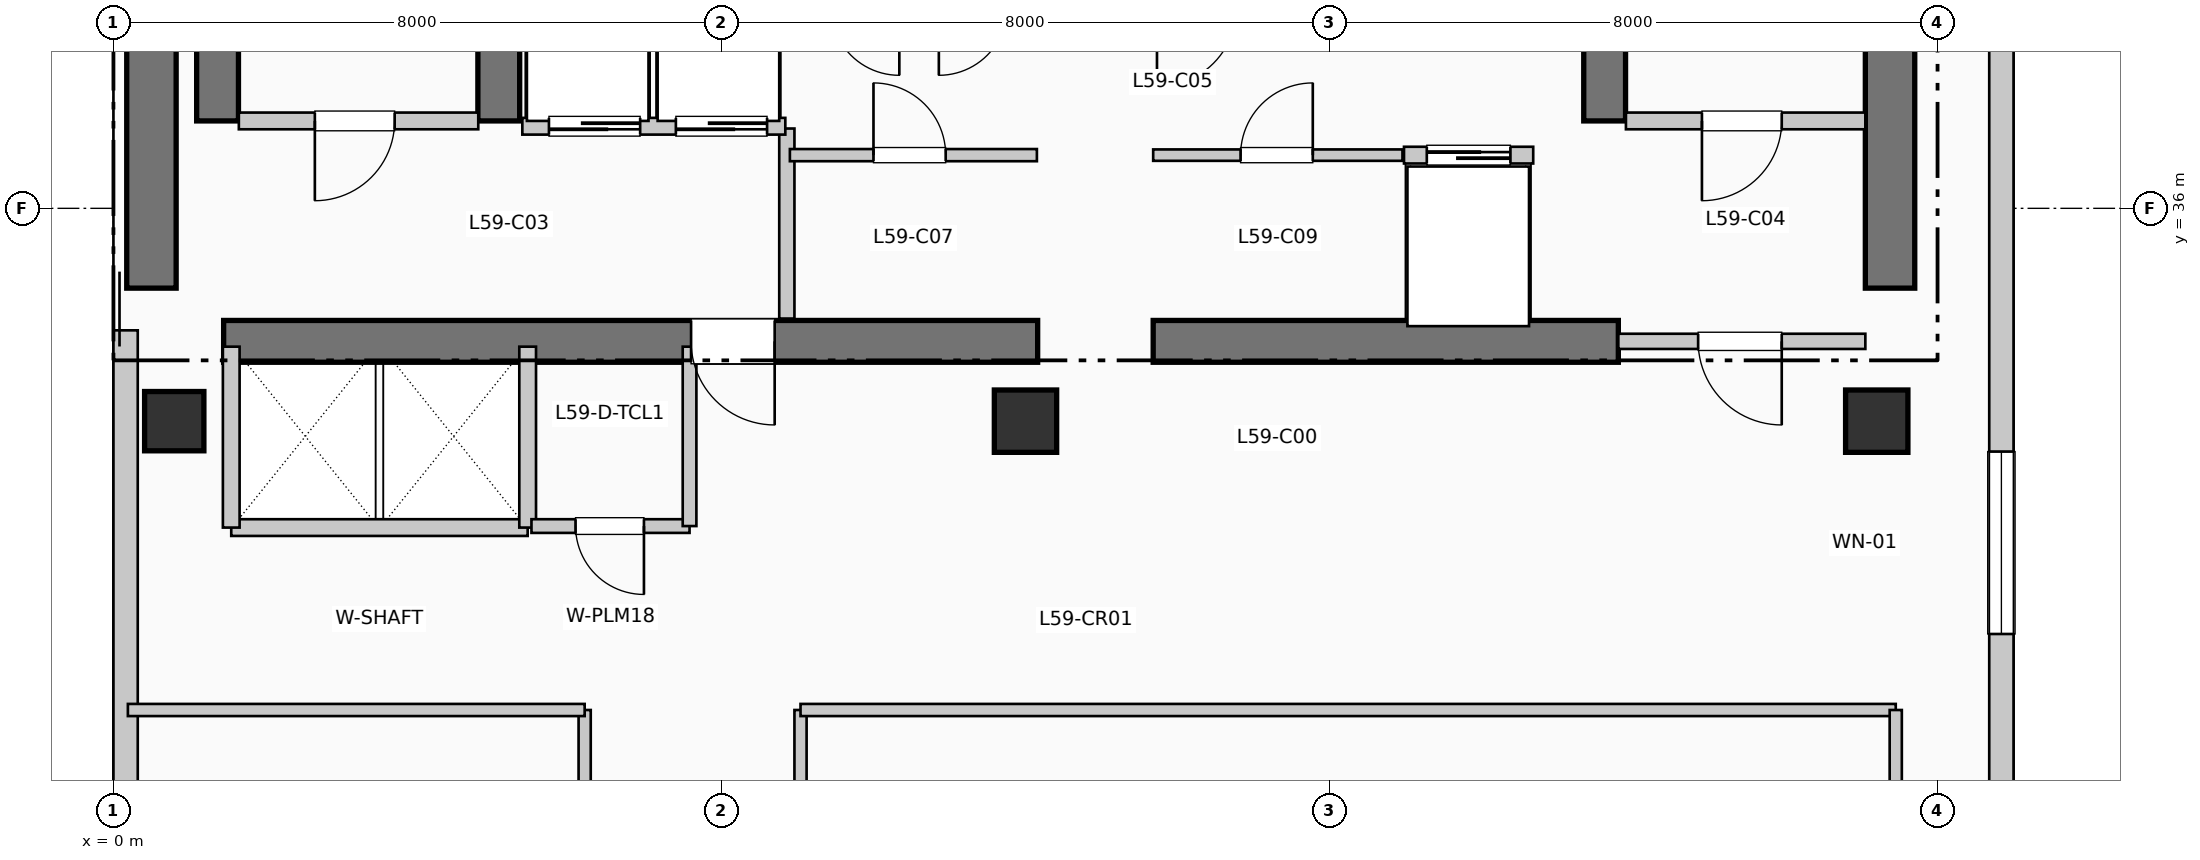
"""IFC4 building model, lengths in metres.
Left out: names, types, materials, properties, quantities, classifications, styles, units other than length and angle.
Written with IfcOpenShell. Run it as: python <this file> out.ifc"""

import sys

from ifc_helpers import new_model, si_unit, direction, frame, frame_2d, origin, origin_2d, place, context, subcontext, project, spatial, rectangle, extrude, element, fill, save


model = new_model("IFC4")
c1 = context("Model", 3, precision=1e-05, world=origin(), true_north=direction((0.0, 1.0)))
c2 = subcontext(c1, "Body", "Model", "MODEL_VIEW")
j1 = project(units=[si_unit("LENGTHUNIT", "METRE"), si_unit("PLANEANGLEUNIT", "RADIAN")], contexts=[c1])
p1 = place(None, origin())
s1 = spatial("IfcSite", under=j1, at=p1, CompositionType="ELEMENT")
p2 = place(p1, origin())
s2 = spatial("IfcBuilding", under=s1, at=p2, CompositionType="ELEMENT")
p3 = place(p2, frame((0.0, 0.0, 243.54)))
s3 = spatial("IfcBuildingStorey", under=s2, at=p3, CompositionType="ELEMENT", Elevation=243.54)
p4 = place(p3, frame((0.5, 34.95, 0.0), z_axis=(0.0, 0.0, 1.0), x_axis=(0.0, 1.0, 0.0)))
e1 = element("IfcWall", 1, at=p4, inside=s3, PredefinedType="SHEAR", context=c2, shape_type="SweptSolid", body=[
    extrude(rectangle(XDim=7.9, YDim=0.65, at=frame_2d((3.95, 0.0))), origin(), (0.0, 0.0, 1.0), 3.96),
])
p5 = place(p3, frame((23.375, 34.95, 0.0), z_axis=(0.0, 0.0, 1.0), x_axis=(0.0, 1.0, 0.0)))
e2 = element("IfcWall", 2, at=p5, inside=s3, PredefinedType="SHEAR", context=c2, shape_type="SweptSolid", body=[
    extrude(rectangle(XDim=10.64, YDim=0.65, at=frame_2d((5.32, 0.0))), origin(), (0.0, 0.0, 1.0), 3.96),
])
p6 = place(p3, frame((1.45, 34.25, 0.0), z_axis=(0.0, 0.0, 1.0), x_axis=(1.0, 0.0, 0.0)))
e3 = element("IfcWall", 3, at=p6, inside=s3, PredefinedType="SHEAR", context=c2, shape_type="SweptSolid", body=[
    extrude(rectangle(XDim=10.71, YDim=0.55, at=frame_2d((5.355, 0.0))), origin(), (0.0, 0.0, 1.0), 3.96),
])
p7 = place(p6, frame((7.25, 0.0, 0.0), z_axis=(0.0, 0.0, 1.0), x_axis=(-1.0, 0.0, 0.0)))
e4 = element("IfcOpeningElement", 4, at=p7, cuts=e3, PredefinedType="OPENING", context=c2, shape_type="SweptSolid", body=[
    extrude(rectangle(XDim=1.1, YDim=2.15, at=frame_2d((0.55, 1.075))), frame((0.0, 0.285, 0.0), z_axis=(0.0, -1.0, 0.0), x_axis=(1.0, 0.0, 0.0)), (0.0, 0.0, 1.0), 0.57),
])
p8 = place(p3, frame((13.68, 34.25, 0.0), z_axis=(0.0, 0.0, 1.0), x_axis=(1.0, 0.0, 0.0)))
e5 = element("IfcWall", 5, at=p8, inside=s3, PredefinedType="SHEAR", context=c2, shape_type="SweptSolid", body=[
    extrude(rectangle(XDim=6.12, YDim=0.55, at=frame_2d((3.06, 0.0))), origin(), (0.0, 0.0, 1.0), 3.96),
])
for number, where, z_axis, x_axis in (
    (6, (1.37, 37.15, 0.0), (0.0, 0.0, 1.0), (0.0, 1.0, 0.0)),
    (7, (5.07, 37.15, 0.0), (0.0, 0.0, 1.0), (0.0, 1.0, 0.0)),
    (8, (19.62, 37.15, 0.0), (0.0, 0.0, 1.0), (0.0, 1.0, 0.0)),
):
    element("IfcWall", number, at=place(p3, frame(where, z_axis=z_axis, x_axis=x_axis)), inside=s3, PredefinedType="SHEAR", context=c2, shape_type="SweptSolid", body=[
        extrude(rectangle(XDim=7.89, YDim=0.55, at=frame_2d((3.945, 0.0))), origin(), (0.0, 0.0, 1.0), 3.96),
    ])
p9 = place(p3, frame((0.8, 33.2, 0.0), z_axis=(0.0, 0.0, 1.0), x_axis=(1.0, 0.0, 0.0)))
e9 = element("IfcColumn", 9, at=p9, inside=s3, PredefinedType="COLUMN", context=c2, shape_type="SweptSolid", body=[
    extrude(rectangle(XDim=0.78, YDim=0.78, at=origin_2d()), origin(), (0.0, 0.0, 1.0), 3.96),
])
for number, where, z_axis, x_axis in (
    (10, (12.0, 33.2, 0.0), (0.0, 0.0, 1.0), (1.0, 0.0, 0.0)),
    (11, (23.2, 33.2, 0.0), (0.0, 0.0, 1.0), (1.0, 0.0, 0.0)),
):
    element("IfcColumn", number, at=place(p3, frame(where, z_axis=z_axis, x_axis=x_axis)), inside=s3, PredefinedType="COLUMN", context=c2, shape_type="SweptSolid", body=[
        extrude(rectangle(XDim=0.82, YDim=0.82, at=origin_2d()), origin(), (0.0, 0.0, 1.0), 3.96),
    ])
p10 = place(p3, frame((24.84, 22.055, 0.0), z_axis=(0.0, 0.0, 1.0), x_axis=(0.0, 1.0, 0.0)))
e12 = element("IfcWall", 12, at=p10, inside=s3, PredefinedType="SOLIDWALL", context=c2, shape_type="SweptSolid", body=[
    extrude(rectangle(XDim=19.09, YDim=0.32, at=frame_2d((9.545, 0.0))), origin(), (0.0, 0.0, 1.0), 3.71),
])
p11 = place(p10, frame((8.345, 0.0, 0.85)))
e13 = element("IfcOpeningElement", 13, at=p11, cuts=e12, PredefinedType="OPENING", context=c2, shape_type="SweptSolid", body=[
    extrude(rectangle(XDim=2.4, YDim=2.05, at=frame_2d((1.2, 1.025))), frame((0.0, 0.17, 0.0), z_axis=(0.0, -1.0, 0.0), x_axis=(1.0, 0.0, 0.0)), (0.0, 0.0, 1.0), 0.34),
])
p12 = place(p3, frame((0.16, 34.395, 0.0), z_axis=(0.0, 0.0, 1.0), x_axis=(0.0, -1.0, 0.0)))
e14 = element("IfcWall", 14, at=p12, inside=s3, PredefinedType="SOLIDWALL", context=c2, shape_type="SweptSolid", body=[
    extrude(rectangle(XDim=25.54, YDim=0.32, at=frame_2d((12.77, 0.0))), origin(), (0.0, 0.0, 1.0), 3.71),
])
p13 = place(p3, frame((1.65, 37.15, 0.0), z_axis=(0.0, 0.0, 1.0), x_axis=(1.0, 0.0, 0.0)))
e15 = element("IfcWall", 15, at=p13, inside=s3, PredefinedType="PARTITIONING", context=c2, shape_type="SweptSolid", body=[
    extrude(rectangle(XDim=3.15, YDim=0.22, at=frame_2d((1.575, 0.0))), origin(), (0.0, 0.0, 1.0), 3.71),
])
p14 = place(p13, frame((2.05, 0.0, 0.0), z_axis=(0.0, 0.0, 1.0), x_axis=(-1.0, 0.0, 0.0)))
e16 = element("IfcOpeningElement", 16, at=p14, cuts=e15, PredefinedType="OPENING", context=c2, shape_type="SweptSolid", body=[
    extrude(rectangle(XDim=1.05, YDim=2.15, at=frame_2d((0.525, 1.075))), frame((0.0, 0.12, 0.0), z_axis=(0.0, -1.0, 0.0), x_axis=(1.0, 0.0, 0.0)), (0.0, 0.0, 1.0), 0.24),
])
p15 = place(p3, frame((8.86, 34.55, 0.0), z_axis=(0.0, 0.0, 1.0), x_axis=(0.0, 1.0, 0.0)))
e17 = element("IfcWall", 17, at=p15, inside=s3, PredefinedType="PARTITIONING", context=c2, shape_type="SweptSolid", body=[
    extrude(rectangle(XDim=2.5, YDim=0.2, at=frame_2d((1.25, 0.0))), origin(), (0.0, 0.0, 1.0), 3.71),
])
p16 = place(p3, frame((19.9, 37.15, 0.0), z_axis=(0.0, 0.0, 1.0), x_axis=(1.0, 0.0, 0.0)))
e18 = element("IfcWall", 18, at=p16, inside=s3, PredefinedType="PARTITIONING", context=c2, shape_type="SweptSolid", body=[
    extrude(rectangle(XDim=3.15, YDim=0.22, at=frame_2d((1.575, 0.0))), origin(), (0.0, 0.0, 1.0), 3.71),
])
p17 = place(p16, frame((2.05, 0.0, 0.0), z_axis=(0.0, 0.0, 1.0), x_axis=(-1.0, 0.0, 0.0)))
e19 = element("IfcOpeningElement", 19, at=p17, cuts=e18, PredefinedType="OPENING", context=c2, shape_type="SweptSolid", body=[
    extrude(rectangle(XDim=1.05, YDim=2.15, at=frame_2d((0.525, 1.075))), frame((0.0, 0.12, 0.0), z_axis=(0.0, -1.0, 0.0), x_axis=(1.0, 0.0, 0.0)), (0.0, 0.0, 1.0), 0.24),
])
p18 = place(p3, frame((19.8, 34.25, 0.0), z_axis=(0.0, 0.0, 1.0), x_axis=(1.0, 0.0, 0.0)))
e20 = element("IfcWall", 20, at=p18, inside=s3, PredefinedType="PARTITIONING", context=c2, shape_type="SweptSolid", body=[
    extrude(rectangle(XDim=3.25, YDim=0.2, at=frame_2d((1.625, 0.0))), origin(), (0.0, 0.0, 1.0), 3.71),
])
p19 = place(p18, frame((2.15, 0.0, 0.0), z_axis=(0.0, 0.0, 1.0), x_axis=(-1.0, 0.0, 0.0)))
e21 = element("IfcOpeningElement", 21, at=p19, cuts=e20, PredefinedType="OPENING", context=c2, shape_type="SweptSolid", body=[
    extrude(rectangle(XDim=1.1, YDim=2.15, at=frame_2d((0.55, 1.075))), frame((0.0, 0.11, 0.0), z_axis=(0.0, -1.0, 0.0), x_axis=(1.0, 0.0, 0.0)), (0.0, 0.0, 1.0), 0.22),
])
p20 = place(p3, frame((5.38, 37.08, 0.0), z_axis=(0.0, 0.0, 1.0), x_axis=(1.0, 0.0, 0.0)))
e22 = element("IfcWall", 22, at=p20, inside=s3, PredefinedType="PARTITIONING", context=c2, shape_type="SweptSolid", body=[
    extrude(rectangle(XDim=3.46, YDim=0.22, at=frame_2d((1.73, 0.0))), origin(), (0.0, 0.0, 1.0), 3.71),
])
p21 = place(p20, frame((1.55, 0.0, 0.0), z_axis=(0.0, 0.0, 1.0), x_axis=(-1.0, 0.0, 0.0)))
e23 = element("IfcOpeningElement", 23, at=p21, cuts=e22, PredefinedType="OPENING", context=c2, shape_type="SweptSolid", body=[
    extrude(rectangle(XDim=1.2, YDim=2.2, at=frame_2d((0.6, 1.1))), frame((0.0, 0.12, 0.0), z_axis=(0.0, -1.0, 0.0), x_axis=(1.0, 0.0, 0.0)), (0.0, 0.0, 1.0), 0.24),
])
p22 = place(p20, frame((3.22, 0.0, 0.0), z_axis=(0.0, 0.0, 1.0), x_axis=(-1.0, 0.0, 0.0)))
e24 = element("IfcOpeningElement", 24, at=p22, cuts=e22, PredefinedType="OPENING", context=c2, shape_type="SweptSolid", body=[
    extrude(rectangle(XDim=1.2, YDim=2.2, at=frame_2d((0.6, 1.1))), frame((0.0, 0.12, 0.0), z_axis=(0.0, -1.0, 0.0), x_axis=(1.0, 0.0, 0.0)), (0.0, 0.0, 1.0), 0.24),
])
p23 = place(p3, frame((1.55, 31.8, 0.0), z_axis=(0.0, 0.0, 1.0), x_axis=(1.0, 0.0, 0.0)))
e25 = element("IfcWall", 25, at=p23, inside=s3, PredefinedType="PARTITIONING", context=c2, shape_type="SweptSolid", body=[
    extrude(rectangle(XDim=3.9, YDim=0.22, at=frame_2d((1.95, 0.0))), origin(), (0.0, 0.0, 1.0), 3.71),
])
for number, where, z_axis, x_axis in (
    (26, (1.55, 31.8, 0.0), (0.0, 0.0, 1.0), (0.0, 1.0, 0.0)),
    (27, (5.45, 31.8, 0.0), (0.0, 0.0, 1.0), (0.0, 1.0, 0.0)),
):
    element("IfcWall", number, at=place(p3, frame(where, z_axis=z_axis, x_axis=x_axis)), inside=s3, PredefinedType="PARTITIONING", context=c2, shape_type="SweptSolid", body=[
        extrude(rectangle(XDim=2.38, YDim=0.22, at=frame_2d((1.19, 0.0))), origin(), (0.0, 0.0, 1.0), 3.71),
    ])
p24 = place(p3, frame((5.5, 31.82, 0.0), z_axis=(0.0, 0.0, 1.0), x_axis=(1.0, 0.0, 0.0)))
e28 = element("IfcWall", 28, at=p24, inside=s3, PredefinedType="PLUMBINGWALL", context=c2, shape_type="SweptSolid", body=[
    extrude(rectangle(XDim=2.08, YDim=0.18, at=frame_2d((1.04, 0.0))), origin(), (0.0, 0.0, 1.0), 3.71),
])
p25 = place(p24, frame((1.48, 0.0, 0.0), z_axis=(0.0, 0.0, 1.0), x_axis=(-1.0, 0.0, 0.0)))
e29 = element("IfcOpeningElement", 29, at=p25, cuts=e28, PredefinedType="OPENING", context=c2, shape_type="SweptSolid", body=[
    extrude(rectangle(XDim=0.9, YDim=2.1, at=frame_2d((0.45, 1.05))), frame((0.0, 0.1, 0.0), z_axis=(0.0, -1.0, 0.0), x_axis=(1.0, 0.0, 0.0)), (0.0, 0.0, 1.0), 0.2),
])
p26 = place(p3, frame((7.58, 31.82, 0.0), z_axis=(0.0, 0.0, 1.0), x_axis=(0.0, 1.0, 0.0)))
e30 = element("IfcWall", 30, at=p26, inside=s3, PredefinedType="PLUMBINGWALL", context=c2, shape_type="SweptSolid", body=[
    extrude(rectangle(XDim=2.36, YDim=0.18, at=frame_2d((1.18, 0.0))), origin(), (0.0, 0.0, 1.0), 3.71),
])
p27 = place(p3, frame((8.9, 36.7, 0.0), z_axis=(0.0, 0.0, 1.0), x_axis=(1.0, 0.0, 0.0)))
e31 = element("IfcWall", 31, at=p27, inside=s3, PredefinedType="PARTITIONING", context=c2, shape_type="SweptSolid", body=[
    extrude(rectangle(XDim=3.25, YDim=0.16, at=frame_2d((1.625, 0.0))), origin(), (0.0, 0.0, 1.0), 3.71),
])
p28 = place(p27, frame((1.1, 0.0, 0.0)))
e32 = element("IfcOpeningElement", 32, at=p28, cuts=e31, PredefinedType="OPENING", context=c2, shape_type="SweptSolid", body=[
    extrude(rectangle(XDim=0.95, YDim=2.15, at=frame_2d((0.475, 1.075))), frame((0.0, 0.09, 0.0), z_axis=(0.0, -1.0, 0.0), x_axis=(1.0, 0.0, 0.0)), (0.0, 0.0, 1.0), 0.18),
])
p29 = place(p3, frame((13.68, 36.7, 0.0), z_axis=(0.0, 0.0, 1.0), x_axis=(1.0, 0.0, 0.0)))
e33 = element("IfcWall", 33, at=p29, inside=s3, PredefinedType="PARTITIONING", context=c2, shape_type="SweptSolid", body=[
    extrude(rectangle(XDim=3.28, YDim=0.15, at=frame_2d((1.64, 0.0))), origin(), (0.0, 0.0, 1.0), 3.71),
])
p30 = place(p29, frame((1.15, 0.0, 0.0)))
e34 = element("IfcOpeningElement", 34, at=p30, cuts=e33, PredefinedType="OPENING", context=c2, shape_type="SweptSolid", body=[
    extrude(rectangle(XDim=0.95, YDim=2.15, at=frame_2d((0.475, 1.075))), frame((0.0, 0.085, 0.0), z_axis=(0.0, -1.0, 0.0), x_axis=(1.0, 0.0, 0.0)), (0.0, 0.0, 1.0), 0.17),
])
p31 = place(p3, frame((16.98, 36.7, 0.0), z_axis=(0.0, 0.0, 1.0), x_axis=(1.0, 0.0, 0.0)))
e35 = element("IfcWall", 35, at=p31, inside=s3, PredefinedType="PARTITIONING", context=c2, shape_type="SweptSolid", body=[
    extrude(rectangle(XDim=1.7, YDim=0.22, at=frame_2d((0.85, 0.0))), origin(), (0.0, 0.0, 1.0), 3.71),
])
p32 = place(p31, frame((0.3, 0.0, 0.0)))
e36 = element("IfcOpeningElement", 36, at=p32, cuts=e35, PredefinedType="OPENING", context=c2, shape_type="SweptSolid", body=[
    extrude(rectangle(XDim=1.1, YDim=2.2, at=frame_2d((0.55, 1.1))), frame((0.0, 0.12, 0.0), z_axis=(0.0, -1.0, 0.0), x_axis=(1.0, 0.0, 0.0)), (0.0, 0.0, 1.0), 0.24),
])
p33 = place(p3, frame((6.2, 11.6, 0.0), z_axis=(0.0, 0.0, 1.0), x_axis=(0.0, 1.0, 0.0)))
e37 = element("IfcWall", 37, at=p33, inside=s3, PredefinedType="PARTITIONING", context=c2, shape_type="SweptSolid", body=[
    extrude(rectangle(XDim=17.8, YDim=0.16, at=frame_2d((8.9, 0.0))), origin(), (0.0, 0.0, 1.0), 3.71),
])
p34 = place(p33, frame((3.857, 0.0, 0.0), z_axis=(0.0, 0.0, 1.0), x_axis=(-1.0, 0.0, 0.0)))
e38 = element("IfcOpeningElement", 38, at=p34, cuts=e37, PredefinedType="OPENING", context=c2, shape_type="SweptSolid", body=[
    extrude(rectangle(XDim=0.95, YDim=2.15, at=frame_2d((0.475, 1.075))), frame((0.0, 0.09, 0.0), z_axis=(0.0, -1.0, 0.0), x_axis=(1.0, 0.0, 0.0)), (0.0, 0.0, 1.0), 0.18),
])
p35 = place(p33, frame((12.757, 0.0, 0.0), z_axis=(0.0, 0.0, 1.0), x_axis=(-1.0, 0.0, 0.0)))
e39 = element("IfcOpeningElement", 39, at=p35, cuts=e37, PredefinedType="OPENING", context=c2, shape_type="SweptSolid", body=[
    extrude(rectangle(XDim=0.95, YDim=2.15, at=frame_2d((0.475, 1.075))), frame((0.0, 0.09, 0.0), z_axis=(0.0, -1.0, 0.0), x_axis=(1.0, 0.0, 0.0)), (0.0, 0.0, 1.0), 0.18),
])
p36 = place(p3, frame((9.04, 11.6, 0.0), z_axis=(0.0, 0.0, 1.0), x_axis=(0.0, 1.0, 0.0)))
e40 = element("IfcWall", 40, at=p36, inside=s3, PredefinedType="PARTITIONING", context=c2, shape_type="SweptSolid", body=[
    extrude(rectangle(XDim=17.8, YDim=0.16, at=frame_2d((8.9, 0.0))), origin(), (0.0, 0.0, 1.0), 3.71),
])
p37 = place(p36, frame((2.195, 0.0, 0.0)))
e41 = element("IfcOpeningElement", 41, at=p37, cuts=e40, PredefinedType="OPENING", context=c2, shape_type="SweptSolid", body=[
    extrude(rectangle(XDim=0.95, YDim=2.15, at=frame_2d((0.475, 1.075))), frame((0.0, 0.09, 0.0), z_axis=(0.0, -1.0, 0.0), x_axis=(1.0, 0.0, 0.0)), (0.0, 0.0, 1.0), 0.18),
])
p38 = place(p36, frame((7.891, 0.0, 0.0)))
e42 = element("IfcOpeningElement", 42, at=p38, cuts=e40, PredefinedType="OPENING", context=c2, shape_type="SweptSolid", body=[
    extrude(rectangle(XDim=0.95, YDim=2.15, at=frame_2d((0.475, 1.075))), frame((0.0, 0.09, 0.0), z_axis=(0.0, -1.0, 0.0), x_axis=(1.0, 0.0, 0.0)), (0.0, 0.0, 1.0), 0.18),
])
p39 = place(p36, frame((14.121, 0.0, 0.0)))
e43 = element("IfcOpeningElement", 43, at=p39, cuts=e40, PredefinedType="OPENING", context=c2, shape_type="SweptSolid", body=[
    extrude(rectangle(XDim=0.95, YDim=2.15, at=frame_2d((0.475, 1.075))), frame((0.0, 0.09, 0.0), z_axis=(0.0, -1.0, 0.0), x_axis=(1.0, 0.0, 0.0)), (0.0, 0.0, 1.0), 0.18),
])
p40 = place(p3, frame((0.19, 29.4, 0.0), z_axis=(0.0, 0.0, 1.0), x_axis=(1.0, 0.0, 0.0)))
e44 = element("IfcWall", 44, at=p40, inside=s3, PredefinedType="PARTITIONING", context=c2, shape_type="SweptSolid", body=[
    extrude(rectangle(XDim=6.01, YDim=0.16, at=frame_2d((3.005, 0.0))), origin(), (0.0, 0.0, 1.0), 3.365),
])
p41 = place(p3, frame((9.04, 29.4, 0.0), z_axis=(0.0, 0.0, 1.0), x_axis=(1.0, 0.0, 0.0)))
e45 = element("IfcWall", 45, at=p41, inside=s3, PredefinedType="PARTITIONING", context=c2, shape_type="SweptSolid", body=[
    extrude(rectangle(XDim=14.41, YDim=0.16, at=frame_2d((7.205, 0.0))), origin(), (0.0, 0.0, 1.0), 3.365),
])
p42 = place(p3, frame((23.45, 6.84, 0.0), z_axis=(0.0, 0.0, 1.0), x_axis=(0.0, 1.0, 0.0)))
e46 = element("IfcWall", 46, at=p42, inside=s3, PredefinedType="PARTITIONING", context=c2, shape_type="SweptSolid", body=[
    extrude(rectangle(XDim=22.56, YDim=0.16, at=frame_2d((11.28, 0.0))), origin(), (0.0, 0.0, 1.0), 3.095),
])
p43 = place(p11, origin())
e47 = element("IfcWindow", 47, at=p43, inside=s3, PartitioningType="SINGLE_PANEL", PredefinedType="WINDOW", context=c2, shape_type="SweptSolid", body=[
    extrude(rectangle(XDim=2.4, YDim=2.05, at=frame_2d((1.2, 1.025))), frame((0.0, 0.03, 0.0), z_axis=(0.0, -1.0, 0.0), x_axis=(1.0, 0.0, 0.0)), (0.0, 0.0, 1.0), 0.06),
])
fill(e13, e47)
p44 = place(p14, origin())
e48 = element("IfcDoor", 48, at=p44, inside=s3, OperationType="SINGLE_SWING_LEFT", PredefinedType="DOOR", context=c2, shape_type="SweptSolid", body=[
    extrude(rectangle(XDim=1.05, YDim=2.15, at=frame_2d((0.525, 1.075))), frame((0.0, 0.025, 0.0), z_axis=(0.0, -1.0, 0.0), x_axis=(1.0, 0.0, 0.0)), (0.0, 0.0, 1.0), 0.05),
])
fill(e16, e48)
p45 = place(p7, origin())
e49 = element("IfcDoor", 49, at=p45, inside=s3, OperationType="SINGLE_SWING_RIGHT", PredefinedType="DOOR", context=c2, shape_type="SweptSolid", body=[
    extrude(rectangle(XDim=1.1, YDim=2.15, at=frame_2d((0.55, 1.075))), frame((0.0, 0.025, 0.0), z_axis=(0.0, -1.0, 0.0), x_axis=(1.0, 0.0, 0.0)), (0.0, 0.0, 1.0), 0.05),
])
fill(e4, e49)
p46 = place(p17, origin())
e50 = element("IfcDoor", 50, at=p46, inside=s3, OperationType="SINGLE_SWING_LEFT", PredefinedType="DOOR", context=c2, shape_type="SweptSolid", body=[
    extrude(rectangle(XDim=1.05, YDim=2.15, at=frame_2d((0.525, 1.075))), frame((0.0, 0.025, 0.0), z_axis=(0.0, -1.0, 0.0), x_axis=(1.0, 0.0, 0.0)), (0.0, 0.0, 1.0), 0.05),
])
fill(e19, e50)
p47 = place(p19, origin())
e51 = element("IfcDoor", 51, at=p47, inside=s3, OperationType="SINGLE_SWING_RIGHT", PredefinedType="DOOR", context=c2, shape_type="SweptSolid", body=[
    extrude(rectangle(XDim=1.1, YDim=2.15, at=frame_2d((0.55, 1.075))), frame((0.0, 0.025, 0.0), z_axis=(0.0, -1.0, 0.0), x_axis=(1.0, 0.0, 0.0)), (0.0, 0.0, 1.0), 0.05),
])
fill(e21, e51)
p48 = place(p21, origin())
e52 = element("IfcDoor", 52, at=p48, inside=s3, OperationType="SLIDING_TO_RIGHT", PredefinedType="DOOR", context=c2, shape_type="SweptSolid", body=[
    extrude(rectangle(XDim=1.2, YDim=2.2, at=frame_2d((0.6, 1.1))), frame((0.0, 0.025, 0.0), z_axis=(0.0, -1.0, 0.0), x_axis=(1.0, 0.0, 0.0)), (0.0, 0.0, 1.0), 0.05),
])
fill(e23, e52)
p49 = place(p22, origin())
e53 = element("IfcDoor", 53, at=p49, inside=s3, OperationType="SLIDING_TO_RIGHT", PredefinedType="DOOR", context=c2, shape_type="SweptSolid", body=[
    extrude(rectangle(XDim=1.2, YDim=2.2, at=frame_2d((0.6, 1.1))), frame((0.0, 0.025, 0.0), z_axis=(0.0, -1.0, 0.0), x_axis=(1.0, 0.0, 0.0)), (0.0, 0.0, 1.0), 0.05),
])
fill(e24, e53)
p50 = place(p25, origin())
e54 = element("IfcDoor", 54, at=p50, inside=s3, OperationType="SINGLE_SWING_RIGHT", PredefinedType="DOOR", context=c2, shape_type="SweptSolid", body=[
    extrude(rectangle(XDim=0.9, YDim=2.1, at=frame_2d((0.45, 1.05))), frame((0.0, 0.025, 0.0), z_axis=(0.0, -1.0, 0.0), x_axis=(1.0, 0.0, 0.0)), (0.0, 0.0, 1.0), 0.05),
])
fill(e29, e54)
p51 = place(p28, origin())
e55 = element("IfcDoor", 55, at=p51, inside=s3, OperationType="SINGLE_SWING_LEFT", PredefinedType="DOOR", context=c2, shape_type="SweptSolid", body=[
    extrude(rectangle(XDim=0.95, YDim=2.15, at=frame_2d((0.475, 1.075))), frame((0.0, 0.025, 0.0), z_axis=(0.0, -1.0, 0.0), x_axis=(1.0, 0.0, 0.0)), (0.0, 0.0, 1.0), 0.05),
])
fill(e32, e55)
p52 = place(p30, origin())
e56 = element("IfcDoor", 56, at=p52, inside=s3, OperationType="SINGLE_SWING_RIGHT", PredefinedType="DOOR", context=c2, shape_type="SweptSolid", body=[
    extrude(rectangle(XDim=0.95, YDim=2.15, at=frame_2d((0.475, 1.075))), frame((0.0, 0.025, 0.0), z_axis=(0.0, -1.0, 0.0), x_axis=(1.0, 0.0, 0.0)), (0.0, 0.0, 1.0), 0.05),
])
fill(e34, e56)
p53 = place(p32, origin())
e57 = element("IfcDoor", 57, at=p53, inside=s3, OperationType="SLIDING_TO_LEFT", PredefinedType="DOOR", context=c2, shape_type="SweptSolid", body=[
    extrude(rectangle(XDim=1.1, YDim=2.2, at=frame_2d((0.55, 1.1))), frame((0.0, 0.025, 0.0), z_axis=(0.0, -1.0, 0.0), x_axis=(1.0, 0.0, 0.0)), (0.0, 0.0, 1.0), 0.05),
])
fill(e36, e57)
save(model, sys.argv[1])
